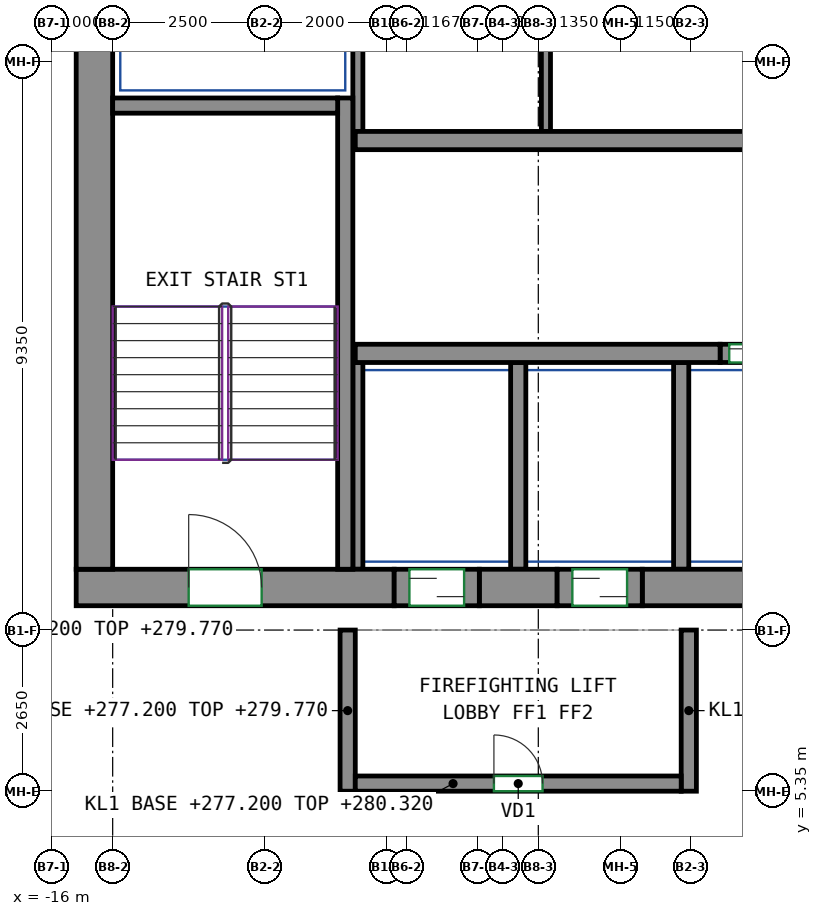
"""IFC4 building model, lengths in metres.
Left out: names, types, materials, properties, quantities, classifications, styles, units other than length and angle.
Written with IfcOpenShell. Run it as: python <this file> out.ifc"""

import sys

from ifc_helpers import new_model, si_unit, direction, frame, frame_2d, origin, place, context, subcontext, project, spatial, rectangle, extrude, source, transform, mapped, element, fill, save


model = new_model("IFC4")
c1 = context("Model", 3, precision=1e-05, world=origin(), true_north=direction((0.0, 1.0)))
c2 = subcontext(c1, "Body", "Model", "MODEL_VIEW")
j1 = project(units=[si_unit("LENGTHUNIT", "METRE"), si_unit("PLANEANGLEUNIT", "RADIAN")], contexts=[c1])
p1 = place(None, origin())
s1 = spatial("IfcSite", under=j1, at=p1, CompositionType="ELEMENT")
p2 = place(p1, origin())
s2 = spatial("IfcBuilding", under=s1, at=p2, CompositionType="ELEMENT")
p3 = place(p2, frame((0.0, 0.0, 277.2)))
s3 = spatial("IfcBuildingStorey", under=s2, at=p3, CompositionType="ELEMENT", Elevation=277.2)
m1 = source(origin(), c2, "Body", "SweptSolid", [
    extrude(rectangle(XDim=5.23, YDim=0.6, at=frame_2d((2.615, 0.0))), origin(), (0.0, 0.0, 1.0), 3.12),
])
p4 = place(p3, frame((-15.6, 8.7, 0.0), z_axis=(0.0, 0.0, 1.0), x_axis=(1.0, 0.0, 0.0)))
e1 = element("IfcWall", 1, at=p4, inside=s3, PredefinedType="SHEAR", context=c2, shape_type="MappedRepresentation", body=[
    mapped(m1, transform((0.0, 0.0, 0.0))),
])
p5 = place(p4, frame((1.85, 0.0, 0.0)))
e2 = element("IfcOpeningElement", 2, at=p5, cuts=e1, PredefinedType="OPENING", context=c2, shape_type="SweptSolid", body=[
    extrude(rectangle(XDim=1.2, YDim=2.1, at=frame_2d((0.6, 1.05))), frame((0.0, 0.31, 0.0), z_axis=(0.0, -1.0, 0.0), x_axis=(1.0, 0.0, 0.0)), (0.0, 0.0, 1.0), 0.62),
])
m2 = source(origin(), c2, "Body", "SweptSolid", [
    extrude(rectangle(XDim=1.28, YDim=0.6, at=frame_2d((0.64, 0.0))), origin(), (0.0, 0.0, 1.0), 3.12),
])
p6 = place(p3, frame((-8.97, 8.7, 0.0), z_axis=(0.0, 0.0, 1.0), x_axis=(1.0, 0.0, 0.0)))
e3 = element("IfcWall", 3, at=p6, inside=s3, PredefinedType="SHEAR", context=c2, shape_type="MappedRepresentation", body=[
    mapped(m2, transform((0.0, 0.0, 0.0))),
])
m3 = source(origin(), c2, "Body", "SweptSolid", [
    extrude(rectangle(XDim=14.18, YDim=0.6, at=frame_2d((7.09, 0.0))), origin(), (0.0, 0.0, 1.0), 3.12),
])
p7 = place(p3, frame((-6.29, 8.7, 0.0), z_axis=(0.0, 0.0, 1.0), x_axis=(1.0, 0.0, 0.0)))
e4 = element("IfcWall", 4, at=p7, inside=s3, PredefinedType="SHEAR", context=c2, shape_type="MappedRepresentation", body=[
    mapped(m3, transform((0.0, 0.0, 0.0))),
])
m4 = source(origin(), c2, "Body", "SweptSolid", [
    extrude(rectangle(XDim=12.0, YDim=0.6, at=frame_2d((6.0, 0.0))), origin(), (0.0, 0.0, 1.0), 3.12),
])
p8 = place(p3, frame((-15.3, 9.0, 0.0), z_axis=(0.0, 0.0, 1.0), x_axis=(0.0, 1.0, 0.0)))
e5 = element("IfcWall", 5, at=p8, inside=s3, PredefinedType="SHEAR", context=c2, shape_type="MappedRepresentation", body=[
    mapped(m4, transform((0.0, 0.0, 0.0))),
])
m5 = source(origin(), c2, "Body", "SweptSolid", [
    extrude(rectangle(XDim=7.75, YDim=0.25, at=frame_2d((3.875, 0.0))), origin(), (0.0, 0.0, 1.0), 3.12),
])
p9 = place(p3, frame((-11.175, 9.0, 0.0), z_axis=(0.0, 0.0, 1.0), x_axis=(0.0, 1.0, 0.0)))
e6 = element("IfcWall", 6, at=p9, inside=s3, PredefinedType="SHEAR", context=c2, shape_type="MappedRepresentation", body=[
    mapped(m5, transform((0.0, 0.0, 0.0))),
])
m6 = source(origin(), c2, "Body", "SweptSolid", [
    extrude(rectangle(XDim=3.7, YDim=0.25, at=frame_2d((1.85, 0.0))), origin(), (0.0, 0.0, 1.0), 3.12),
])
p10 = place(p3, frame((-15.0, 16.625, 0.0), z_axis=(0.0, 0.0, 1.0), x_axis=(1.0, 0.0, 0.0)))
e7 = element("IfcWall", 7, at=p10, inside=s3, PredefinedType="SHEAR", context=c2, shape_type="MappedRepresentation", body=[
    mapped(m6, transform((0.0, 0.0, 0.0))),
])
m7 = source(origin(), c2, "Body", "SweptSolid", [
    extrude(rectangle(XDim=6.0, YDim=0.3, at=frame_2d((3.0, 0.0))), origin(), (0.0, 0.0, 1.0), 3.12),
])
p11 = place(p3, frame((-11.01, 12.55, 0.0), z_axis=(0.0, 0.0, 1.0), x_axis=(1.0, 0.0, 0.0)))
e8 = element("IfcWall", 8, at=p11, inside=s3, PredefinedType="SHEAR", context=c2, shape_type="MappedRepresentation", body=[
    mapped(m7, transform((0.0, 0.0, 0.0))),
])
m8 = source(origin(), c2, "Body", "SweptSolid", [
    extrude(rectangle(XDim=22.08, YDim=0.3, at=frame_2d((11.04, 0.0))), origin(), (0.0, 0.0, 1.0), 3.12),
])
p12 = place(p3, frame((-11.01, 16.05, 0.0), z_axis=(0.0, 0.0, 1.0), x_axis=(1.0, 0.0, 0.0)))
e9 = element("IfcWall", 9, at=p12, inside=s3, PredefinedType="SHEAR", context=c2, shape_type="MappedRepresentation", body=[
    mapped(m8, transform((0.0, 0.0, 0.0))),
])
m9 = source(origin(), c2, "Body", "SweptSolid", [
    extrude(rectangle(XDim=1.4, YDim=0.3, at=frame_2d((0.7, 0.0))), origin(), (0.0, 0.0, 1.0), 3.12),
])
p13 = place(p3, frame((-5.01, 12.55, 0.0), z_axis=(0.0, 0.0, 1.0), x_axis=(1.0, 0.0, 0.0)))
e10 = element("IfcWall", 10, at=p13, inside=s3, PredefinedType="PARTITIONING", context=c2, shape_type="MappedRepresentation", body=[
    mapped(m9, transform((0.0, 0.0, 0.0))),
])
p14 = place(p13, frame((0.15, 0.0, 0.0)))
e11 = element("IfcOpeningElement", 11, at=p14, cuts=e10, PredefinedType="OPENING", context=c2, shape_type="SweptSolid", body=[
    extrude(rectangle(XDim=1.1, YDim=2.1, at=frame_2d((0.55, 1.05))), frame((0.0, 0.16, 0.0), z_axis=(0.0, -1.0, 0.0), x_axis=(1.0, 0.0, 0.0)), (0.0, 0.0, 1.0), 0.32),
])
m10 = source(origin(), c2, "Body", "SweptSolid", [
    extrude(rectangle(XDim=2.65, YDim=0.25, at=frame_2d((1.325, 0.0))), origin(), (0.0, 0.0, 1.0), 2.57),
])
for number, where, z_axis, x_axis in (
    (12, (-11.135, 5.35, 0.0), (0.0, 0.0, 1.0), (0.0, 1.0, 0.0)),
    (13, (-5.525, 5.35, 0.0), (0.0, 0.0, 1.0), (0.0, 1.0, 0.0)),
):
    element("IfcWall", number, at=place(p3, frame(where, z_axis=z_axis, x_axis=x_axis)), inside=s3, PredefinedType="PARTITIONING", context=c2, shape_type="MappedRepresentation", body=[
        mapped(m10, transform((0.0, 0.0, 0.0))),
    ])
m11 = source(origin(), c2, "Body", "SweptSolid", [
    extrude(rectangle(XDim=5.36, YDim=0.25, at=frame_2d((2.68, 0.0))), origin(), (0.0, 0.0, 1.0), 3.12),
])
p15 = place(p3, frame((-11.01, 5.475, 0.0), z_axis=(0.0, 0.0, 1.0), x_axis=(1.0, 0.0, 0.0)))
e14 = element("IfcWall", 14, at=p15, inside=s3, PredefinedType="PARTITIONING", context=c2, shape_type="MappedRepresentation", body=[
    mapped(m11, transform((0.0, 0.0, 0.0))),
])
p16 = place(p15, frame((2.28, 0.0, 0.0)))
e15 = element("IfcOpeningElement", 15, at=p16, cuts=e14, PredefinedType="OPENING", context=c2, shape_type="SweptSolid", body=[
    extrude(rectangle(XDim=0.8, YDim=2.0, at=frame_2d((0.4, 1.0))), frame((0.0, 0.135, 0.0), z_axis=(0.0, -1.0, 0.0), x_axis=(1.0, 0.0, 0.0)), (0.0, 0.0, 1.0), 0.27),
])
m12 = source(origin(), c2, "Body", "SweptSolid", [
    extrude(rectangle(XDim=4.8, YDim=0.165, at=frame_2d((2.4, 0.0))), origin(), (0.0, 0.0, 1.0), 3.12),
])
p17 = place(p3, frame((-10.968, 16.2, 0.0), z_axis=(0.0, 0.0, 1.0), x_axis=(0.0, 1.0, 0.0)))
e16 = element("IfcWall", 16, at=p17, inside=s3, PredefinedType="PARTITIONING", context=c2, shape_type="MappedRepresentation", body=[
    mapped(m12, transform((0.0, 0.0, 0.0))),
])
m13 = source(origin(), c2, "Body", "SweptSolid", [
    extrude(rectangle(XDim=3.4, YDim=0.165, at=frame_2d((1.7, 0.0))), origin(), (0.0, 0.0, 1.0), 3.12),
])
p18 = place(p3, frame((-10.968, 9.0, 0.0), z_axis=(0.0, 0.0, 1.0), x_axis=(0.0, 1.0, 0.0)))
e17 = element("IfcWall", 17, at=p18, inside=s3, PredefinedType="PARTITIONING", context=c2, shape_type="MappedRepresentation", body=[
    mapped(m13, transform((0.0, 0.0, 0.0))),
])
m14 = source(origin(), c2, "Body", "SweptSolid", [
    extrude(rectangle(XDim=3.4, YDim=0.25, at=frame_2d((1.7, 0.0))), origin(), (0.0, 0.0, 1.0), 3.12),
])
for number, where, z_axis, x_axis in (
    (18, (-5.65, 9.0, 0.0), (0.0, 0.0, 1.0), (0.0, 1.0, 0.0)),
    (19, (-8.33, 9.0, 0.0), (0.0, 0.0, 1.0), (0.0, 1.0, 0.0)),
):
    element("IfcWall", number, at=place(p3, frame(where, z_axis=z_axis, x_axis=x_axis)), inside=s3, PredefinedType="PARTITIONING", context=c2, shape_type="MappedRepresentation", body=[
        mapped(m14, transform((0.0, 0.0, 0.0))),
    ])
m15 = source(origin(), c2, "Body", "SweptSolid", [
    extrude(rectangle(XDim=4.8, YDim=0.15, at=frame_2d((2.4, 0.0))), origin(), (0.0, 0.0, 1.0), 3.12),
])
p19 = place(p3, frame((-7.875, 16.2, 0.0), z_axis=(0.0, 0.0, 1.0), x_axis=(0.0, 1.0, 0.0)))
e20 = element("IfcWall", 20, at=p19, inside=s3, PredefinedType="PARTITIONING", context=c2, shape_type="MappedRepresentation", body=[
    mapped(m15, transform((0.0, 0.0, 0.0))),
])
m16 = source(origin(), c2, "Body", "SweptSolid", [
    extrude(rectangle(XDim=1.4, YDim=0.6, at=frame_2d((0.7, 0.0))), origin(), (0.0, 0.0, 1.0), 2.7),
])
p20 = place(p3, frame((-10.37, 8.7, 0.0), z_axis=(0.0, 0.0, 1.0), x_axis=(1.0, 0.0, 0.0)))
e21 = element("IfcWall", 21, at=p20, inside=s3, PredefinedType="PARTITIONING", context=c2, shape_type="MappedRepresentation", body=[
    mapped(m16, transform((0.0, 0.0, 0.0))),
])
p21 = place(p20, frame((0.25, 0.0, 0.0)))
e22 = element("IfcOpeningElement", 22, at=p21, cuts=e21, PredefinedType="OPENING", context=c2, shape_type="SweptSolid", body=[
    extrude(rectangle(XDim=0.9, YDim=2.1, at=frame_2d((0.45, 1.05))), frame((0.0, 0.31, 0.0), z_axis=(0.0, -1.0, 0.0), x_axis=(1.0, 0.0, 0.0)), (0.0, 0.0, 1.0), 0.62),
])
m17 = source(origin(), c2, "Body", "SweptSolid", [
    extrude(rectangle(XDim=1.4, YDim=0.6, at=frame_2d((0.7, 0.0))), origin(), (0.0, 0.0, 1.0), 2.7),
])
p22 = place(p3, frame((-7.69, 8.7, 0.0), z_axis=(0.0, 0.0, 1.0), x_axis=(1.0, 0.0, 0.0)))
e23 = element("IfcWall", 23, at=p22, inside=s3, PredefinedType="PARTITIONING", context=c2, shape_type="MappedRepresentation", body=[
    mapped(m17, transform((0.0, 0.0, 0.0))),
])
p23 = place(p22, frame((0.25, 0.0, 0.0)))
e24 = element("IfcOpeningElement", 24, at=p23, cuts=e23, PredefinedType="OPENING", context=c2, shape_type="SweptSolid", body=[
    extrude(rectangle(XDim=0.9, YDim=2.1, at=frame_2d((0.45, 1.05))), frame((0.0, 0.31, 0.0), z_axis=(0.0, -1.0, 0.0), x_axis=(1.0, 0.0, 0.0)), (0.0, 0.0, 1.0), 0.62),
])
p24 = place(p16, origin())
e25 = element("IfcDoor", 25, at=p24, inside=s3, OperationType="SINGLE_SWING_LEFT", PredefinedType="DOOR", context=c2, shape_type="SweptSolid", body=[
    extrude(rectangle(XDim=0.8, YDim=2.0, at=frame_2d((0.4, 1.0))), frame((0.0, 0.025, 0.0), z_axis=(0.0, -1.0, 0.0), x_axis=(1.0, 0.0, 0.0)), (0.0, 0.0, 1.0), 0.05),
])
fill(e15, e25)
p25 = place(p21, origin())
e26 = element("IfcDoor", 26, at=p25, inside=s3, OperationType="SLIDING_TO_LEFT", PredefinedType="DOOR", context=c2, shape_type="SweptSolid", body=[
    extrude(rectangle(XDim=0.9, YDim=2.1, at=frame_2d((0.45, 1.05))), frame((0.0, 0.205, 0.0), z_axis=(0.0, -1.0, 0.0), x_axis=(1.0, 0.0, 0.0)), (0.0, 0.0, 1.0), 0.05),
])
fill(e22, e26)
p26 = place(p23, origin())
e27 = element("IfcDoor", 27, at=p26, inside=s3, OperationType="SLIDING_TO_RIGHT", PredefinedType="DOOR", context=c2, shape_type="SweptSolid", body=[
    extrude(rectangle(XDim=0.9, YDim=2.1, at=frame_2d((0.45, 1.05))), frame((0.0, 0.205, 0.0), z_axis=(0.0, -1.0, 0.0), x_axis=(1.0, 0.0, 0.0)), (0.0, 0.0, 1.0), 0.05),
])
fill(e24, e27)
p27 = place(p14, origin())
e28 = element("IfcDoor", 28, at=p27, inside=s3, OperationType="DOUBLE_DOOR_SLIDING", PredefinedType="DOOR", context=c2, shape_type="SweptSolid", body=[
    extrude(rectangle(XDim=1.1, YDim=2.1, at=frame_2d((0.55, 1.05))), frame((0.0, 0.025, 0.0), z_axis=(0.0, -1.0, 0.0), x_axis=(1.0, 0.0, 0.0)), (0.0, 0.0, 1.0), 0.05),
])
fill(e11, e28)
p28 = place(p5, origin())
e29 = element("IfcDoor", 29, at=p28, inside=s3, OperationType="DOUBLE_DOOR_SINGLE_SWING", PredefinedType="DOOR", context=c2, shape_type="SweptSolid", body=[
    extrude(rectangle(XDim=1.2, YDim=2.1, at=frame_2d((0.6, 1.05))), frame((0.0, 0.205, 0.0), z_axis=(0.0, -1.0, 0.0), x_axis=(1.0, 0.0, 0.0)), (0.0, 0.0, 1.0), 0.05),
])
fill(e2, e29)
save(model, sys.argv[1])
